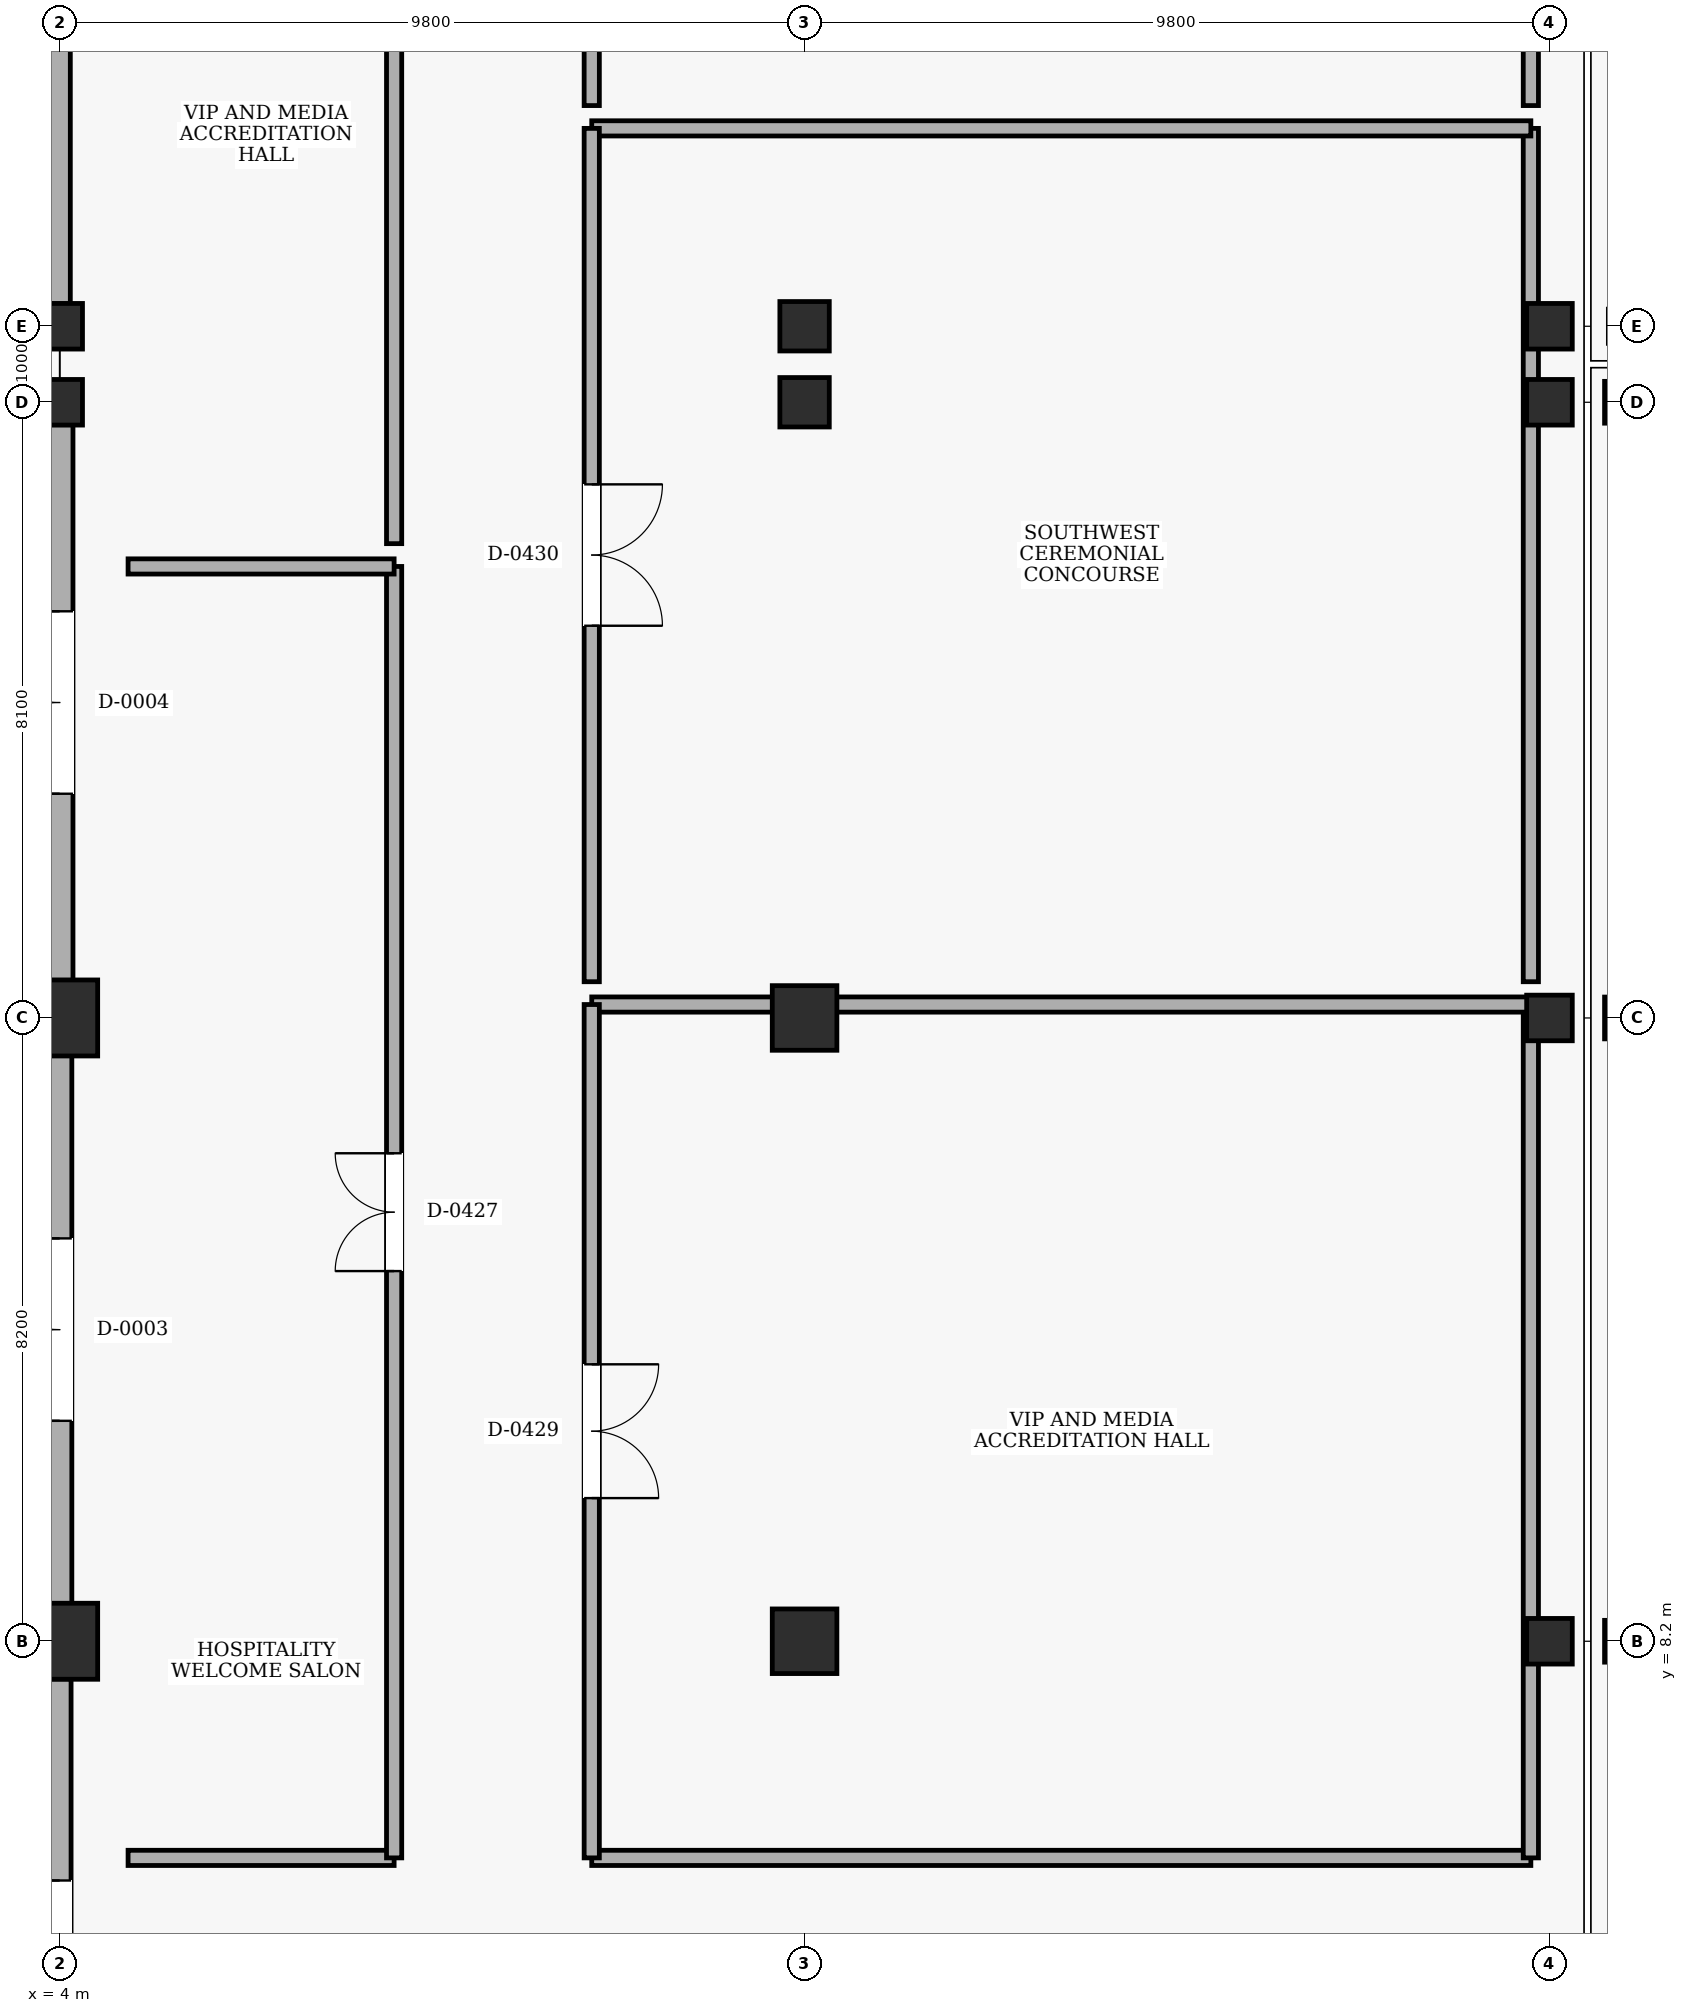
"""IFC4 building model, lengths in metres.
Left out: names, types, materials, properties, quantities, classifications, styles, units other than length and angle.
Written with IfcOpenShell. Run it as: python <this file> out.ifc"""

import sys

from ifc_helpers import new_model, si_unit, direction, frame, frame_2d, origin, origin_2d, place, context, subcontext, project, spatial, rectangle, extrude, element, fill, save


model = new_model("IFC4")
c1 = context("Model", 3, precision=1e-05, world=origin(), true_north=direction((0.0, 1.0)))
c2 = subcontext(c1, "Body", "Model", "MODEL_VIEW")
j1 = project(units=[si_unit("LENGTHUNIT", "METRE"), si_unit("PLANEANGLEUNIT", "RADIAN")], contexts=[c1])
p1 = place(None, origin())
s1 = spatial("IfcSite", under=j1, at=p1, CompositionType="ELEMENT")
p2 = place(p1, origin())
s2 = spatial("IfcBuilding", under=s1, at=p2, CompositionType="ELEMENT")
p3 = place(p2, origin())
s3 = spatial("IfcBuildingStorey", under=s2, at=p3, CompositionType="ELEMENT", Elevation=0.0)
for number, where, z_axis, x_axis in (
    (1, (4.0, 8.2, 0.0), (0.0, 0.0, 1.0), (1.0, 0.0, 0.0)),
    (2, (4.0, 16.4, 0.0), (0.0, 0.0, 1.0), (1.0, 0.0, 0.0)),
):
    element("IfcColumn", number, at=place(p3, frame(where, z_axis=z_axis, x_axis=x_axis)), inside=s3, PredefinedType="COLUMN", context=c2, shape_type="SweptSolid", body=[
        extrude(rectangle(XDim=1.0, YDim=1.0, at=origin_2d()), origin(), (0.0, 0.0, 1.0), 5.4),
    ])
for number, where, z_axis, x_axis in (
    (3, (4.0, 24.5, 0.0), (0.0, 0.0, 1.0), (1.0, 0.0, 0.0)),
    (4, (4.0, 25.5, 0.0), (0.0, 0.0, 1.0), (1.0, 0.0, 0.0)),
):
    element("IfcColumn", number, at=place(p3, frame(where, z_axis=z_axis, x_axis=x_axis)), inside=s3, PredefinedType="COLUMN", context=c2, shape_type="SweptSolid", body=[
        extrude(rectangle(XDim=0.6, YDim=0.6, at=origin_2d()), origin(), (0.0, 0.0, 1.0), 5.4),
    ])
for number, where, z_axis, x_axis in (
    (5, (13.8, 8.2, 0.0), (0.0, 0.0, 1.0), (1.0, 0.0, 0.0)),
    (6, (13.8, 16.4, 0.0), (0.0, 0.0, 1.0), (1.0, 0.0, 0.0)),
):
    element("IfcColumn", number, at=place(p3, frame(where, z_axis=z_axis, x_axis=x_axis)), inside=s3, PredefinedType="COLUMN", context=c2, shape_type="SweptSolid", body=[
        extrude(rectangle(XDim=0.85, YDim=0.85, at=origin_2d()), origin(), (0.0, 0.0, 1.0), 5.4),
    ])
for number, where, z_axis, x_axis in (
    (7, (13.8, 24.5, 0.0), (0.0, 0.0, 1.0), (1.0, 0.0, 0.0)),
    (8, (13.8, 25.5, 0.0), (0.0, 0.0, 1.0), (1.0, 0.0, 0.0)),
):
    element("IfcColumn", number, at=place(p3, frame(where, z_axis=z_axis, x_axis=x_axis)), inside=s3, PredefinedType="COLUMN", context=c2, shape_type="SweptSolid", body=[
        extrude(rectangle(XDim=0.65, YDim=0.65, at=origin_2d()), origin(), (0.0, 0.0, 1.0), 5.4),
    ])
for number, where, z_axis, x_axis in (
    (9, (23.6, 8.2, 0.0), (0.0, 0.0, 1.0), (1.0, 0.0, 0.0)),
    (10, (23.6, 16.4, 0.0), (0.0, 0.0, 1.0), (1.0, 0.0, 0.0)),
    (11, (23.6, 24.5, 0.0), (0.0, 0.0, 1.0), (1.0, 0.0, 0.0)),
    (12, (23.6, 25.5, 0.0), (0.0, 0.0, 1.0), (1.0, 0.0, 0.0)),
):
    element("IfcColumn", number, at=place(p3, frame(where, z_axis=z_axis, x_axis=x_axis)), inside=s3, PredefinedType="COLUMN", context=c2, shape_type="SweptSolid", body=[
        extrude(rectangle(XDim=0.6, YDim=0.6, at=origin_2d()), origin(), (0.0, 0.0, 1.0), 5.4),
    ])
for number, where, z_axis, x_axis in (
    (13, (24.6, 8.2, 0.0), (0.0, 0.0, 1.0), (1.0, 0.0, 0.0)),
    (14, (24.6, 16.4, 0.0), (0.0, 0.0, 1.0), (1.0, 0.0, 0.0)),
    (15, (24.6, 24.5, 0.0), (0.0, 0.0, 1.0), (1.0, 0.0, 0.0)),
):
    element("IfcColumn", number, at=place(p3, frame(where, z_axis=z_axis, x_axis=x_axis)), inside=s3, PredefinedType="COLUMN", context=c2, shape_type="SweptSolid", body=[
        extrude(rectangle(XDim=0.55, YDim=0.55, at=origin_2d()), origin(), (0.0, 0.0, 1.0), 5.4),
    ])
p4 = place(p3, frame((4.0, 0.0, 0.0), z_axis=(0.0, 0.0, 1.0), x_axis=(0.0, 1.0, 0.0)))
e16 = element("IfcWall", 16, at=p4, inside=s3, PredefinedType="SOLIDWALL", context=c2, shape_type="SweptSolid", body=[
    extrude(rectangle(XDim=7.705, YDim=0.3, at=frame_2d((3.853, 0.0))), origin(), (0.0, 0.0, 1.0), 5.08),
])
p5 = place(p4, frame((2.653, 0.0, 0.0)))
e17 = element("IfcOpeningElement", 17, at=p5, cuts=e16, PredefinedType="OPENING", context=c2, shape_type="SweptSolid", body=[
    extrude(rectangle(XDim=2.4, YDim=2.2, at=frame_2d((1.2, 1.1))), frame((0.0, 0.16, 0.0), z_axis=(0.0, -1.0, 0.0), x_axis=(1.0, 0.0, 0.0)), (0.0, 0.0, 1.0), 0.32),
])
p6 = place(p3, frame((4.0, 8.695, 0.0), z_axis=(0.0, 0.0, 1.0), x_axis=(0.0, 1.0, 0.0)))
e18 = element("IfcWall", 18, at=p6, inside=s3, PredefinedType="SOLIDWALL", context=c2, shape_type="SweptSolid", body=[
    extrude(rectangle(XDim=7.21, YDim=0.32, at=frame_2d((3.605, 0.0))), origin(), (0.0, 0.0, 1.0), 4.26),
])
p7 = place(p6, frame((2.405, 0.0, 0.0)))
e19 = element("IfcOpeningElement", 19, at=p7, cuts=e18, PredefinedType="OPENING", context=c2, shape_type="SweptSolid", body=[
    extrude(rectangle(XDim=2.4, YDim=2.2, at=frame_2d((1.2, 1.1))), frame((0.0, 0.17, 0.0), z_axis=(0.0, -1.0, 0.0), x_axis=(1.0, 0.0, 0.0)), (0.0, 0.0, 1.0), 0.34),
])
p8 = place(p3, frame((4.0, 16.895, 0.0), z_axis=(0.0, 0.0, 1.0), x_axis=(0.0, 1.0, 0.0)))
e20 = element("IfcWall", 20, at=p8, inside=s3, PredefinedType="SOLIDWALL", context=c2, shape_type="SweptSolid", body=[
    extrude(rectangle(XDim=7.31, YDim=0.35, at=frame_2d((3.655, 0.0))), origin(), (0.0, 0.0, 1.0), 4.26),
])
p9 = place(p8, frame((2.455, 0.0, 0.0)))
e21 = element("IfcOpeningElement", 21, at=p9, cuts=e20, PredefinedType="OPENING", context=c2, shape_type="SweptSolid", body=[
    extrude(rectangle(XDim=2.4, YDim=2.2, at=frame_2d((1.2, 1.1))), frame((0.0, 0.185, 0.0), z_axis=(0.0, -1.0, 0.0), x_axis=(1.0, 0.0, 0.0)), (0.0, 0.0, 1.0), 0.37),
])
p10 = place(p3, frame((4.0, 25.795, 0.0), z_axis=(0.0, 0.0, 1.0), x_axis=(0.0, 1.0, 0.0)))
e22 = element("IfcWall", 22, at=p10, inside=s3, PredefinedType="SOLIDWALL", context=c2, shape_type="SweptSolid", body=[
    extrude(rectangle(XDim=13.61, YDim=0.28, at=frame_2d((6.805, 0.0))), origin(), (0.0, 0.0, 1.0), 4.61),
])
p11 = place(p10, frame((5.605, 0.0, 0.0)))
e23 = element("IfcOpeningElement", 23, at=p11, cuts=e22, PredefinedType="OPENING", context=c2, shape_type="SweptSolid", body=[
    extrude(rectangle(XDim=2.4, YDim=2.2, at=frame_2d((1.2, 1.1))), frame((0.0, 0.15, 0.0), z_axis=(0.0, -1.0, 0.0), x_axis=(1.0, 0.0, 0.0)), (0.0, 0.0, 1.0), 0.3),
])
p12 = place(p3, frame((4.9, 5.35, 0.0), z_axis=(0.0, 0.0, 1.0), x_axis=(1.0, 0.0, 0.0)))
e24 = element("IfcWall", 24, at=p12, inside=s3, PredefinedType="PARTITIONING", context=c2, shape_type="SweptSolid", body=[
    extrude(rectangle(XDim=3.5, YDim=0.2, at=frame_2d((1.75, 0.0))), origin(), (0.0, 0.0, 1.0), 5.08),
])
p13 = place(p3, frame((8.4, 5.35, 0.0), z_axis=(0.0, 0.0, 1.0), x_axis=(0.0, 1.0, 0.0)))
e25 = element("IfcWall", 25, at=p13, inside=s3, PredefinedType="PARTITIONING", context=c2, shape_type="SweptSolid", body=[
    extrude(rectangle(XDim=16.99, YDim=0.2, at=frame_2d((8.495, 0.0))), origin(), (0.0, 0.0, 1.0), 5.08),
])
p14 = place(p13, frame((7.72, 0.0, 0.0)))
e26 = element("IfcOpeningElement", 26, at=p14, cuts=e25, PredefinedType="OPENING", context=c2, shape_type="SweptSolid", body=[
    extrude(rectangle(XDim=1.55, YDim=2.2, at=frame_2d((0.775, 1.1))), frame((0.0, 0.11, 0.0), z_axis=(0.0, -1.0, 0.0), x_axis=(1.0, 0.0, 0.0)), (0.0, 0.0, 1.0), 0.22),
])
p15 = place(p3, frame((8.4, 22.34, 0.0), z_axis=(0.0, 0.0, 1.0), x_axis=(-1.0, 0.0, 0.0)))
e27 = element("IfcWall", 27, at=p15, inside=s3, PredefinedType="PARTITIONING", context=c2, shape_type="SweptSolid", body=[
    extrude(rectangle(XDim=3.5, YDim=0.2, at=frame_2d((1.75, 0.0))), origin(), (0.0, 0.0, 1.0), 5.08),
])
p16 = place(p3, frame((8.4, 22.64, 0.0), z_axis=(0.0, 0.0, 1.0), x_axis=(0.0, 1.0, 0.0)))
e28 = element("IfcWall", 28, at=p16, inside=s3, PredefinedType="PARTITIONING", context=c2, shape_type="SweptSolid", body=[
    extrude(rectangle(XDim=16.99, YDim=0.2, at=frame_2d((8.495, 0.0))), origin(), (0.0, 0.0, 1.0), 5.08),
])
p17 = place(p16, frame((7.655, 0.0, 0.0)))
e29 = element("IfcOpeningElement", 29, at=p17, cuts=e28, PredefinedType="OPENING", context=c2, shape_type="SweptSolid", body=[
    extrude(rectangle(XDim=1.68, YDim=2.25, at=frame_2d((0.84, 1.125))), frame((0.0, 0.11, 0.0), z_axis=(0.0, -1.0, 0.0), x_axis=(1.0, 0.0, 0.0)), (0.0, 0.0, 1.0), 0.22),
])
p18 = place(p3, frame((11.0, 5.35, 0.0), z_axis=(0.0, 0.0, 1.0), x_axis=(1.0, 0.0, 0.0)))
e30 = element("IfcWall", 30, at=p18, inside=s3, PredefinedType="PARTITIONING", context=c2, shape_type="SweptSolid", body=[
    extrude(rectangle(XDim=12.355, YDim=0.2, at=frame_2d((6.177, 0.0))), origin(), (0.0, 0.0, 1.0), 5.08),
])
p19 = place(p3, frame((23.355, 5.35, 0.0), z_axis=(0.0, 0.0, 1.0), x_axis=(0.0, 1.0, 0.0)))
e31 = element("IfcWall", 31, at=p19, inside=s3, PredefinedType="PARTITIONING", context=c2, shape_type="SweptSolid", body=[
    extrude(rectangle(XDim=11.227, YDim=0.2, at=frame_2d((5.613, 0.0))), origin(), (0.0, 0.0, 1.0), 4.31),
])
p20 = place(p3, frame((23.355, 16.577, 0.0), z_axis=(0.0, 0.0, 1.0), x_axis=(-1.0, 0.0, 0.0)))
e32 = element("IfcWall", 32, at=p20, inside=s3, PredefinedType="PARTITIONING", context=c2, shape_type="SweptSolid", body=[
    extrude(rectangle(XDim=12.355, YDim=0.2, at=frame_2d((6.177, 0.0))), origin(), (0.0, 0.0, 1.0), 4.21),
])
p21 = place(p3, frame((11.0, 16.577, 0.0), z_axis=(0.0, 0.0, 1.0), x_axis=(0.0, -1.0, 0.0)))
e33 = element("IfcWall", 33, at=p21, inside=s3, PredefinedType="PARTITIONING", context=c2, shape_type="SweptSolid", body=[
    extrude(rectangle(XDim=11.227, YDim=0.2, at=frame_2d((5.613, 0.0))), origin(), (0.0, 0.0, 1.0), 5.08),
])
p22 = place(p21, frame((4.733, 0.0, 0.0)))
e34 = element("IfcOpeningElement", 34, at=p22, cuts=e33, PredefinedType="OPENING", context=c2, shape_type="SweptSolid", body=[
    extrude(rectangle(XDim=1.76, YDim=2.25, at=frame_2d((0.88, 1.125))), frame((0.0, 0.11, 0.0), z_axis=(0.0, -1.0, 0.0), x_axis=(1.0, 0.0, 0.0)), (0.0, 0.0, 1.0), 0.22),
])
p23 = place(p3, frame((23.355, 16.877, 0.0), z_axis=(0.0, 0.0, 1.0), x_axis=(0.0, 1.0, 0.0)))
e35 = element("IfcWall", 35, at=p23, inside=s3, PredefinedType="PARTITIONING", context=c2, shape_type="SweptSolid", body=[
    extrude(rectangle(XDim=11.227, YDim=0.2, at=frame_2d((5.613, 0.0))), origin(), (0.0, 0.0, 1.0), 4.31),
])
p24 = place(p3, frame((23.355, 28.103, 0.0), z_axis=(0.0, 0.0, 1.0), x_axis=(-1.0, 0.0, 0.0)))
e36 = element("IfcWall", 36, at=p24, inside=s3, PredefinedType="PARTITIONING", context=c2, shape_type="SweptSolid", body=[
    extrude(rectangle(XDim=12.355, YDim=0.2, at=frame_2d((6.177, 0.0))), origin(), (0.0, 0.0, 1.0), 5.08),
])
p25 = place(p3, frame((11.0, 28.103, 0.0), z_axis=(0.0, 0.0, 1.0), x_axis=(0.0, -1.0, 0.0)))
e37 = element("IfcWall", 37, at=p25, inside=s3, PredefinedType="PARTITIONING", context=c2, shape_type="SweptSolid", body=[
    extrude(rectangle(XDim=11.227, YDim=0.2, at=frame_2d((5.613, 0.0))), origin(), (0.0, 0.0, 1.0), 5.08),
])
p26 = place(p25, frame((4.683, 0.0, 0.0)))
e38 = element("IfcOpeningElement", 38, at=p26, cuts=e37, PredefinedType="OPENING", context=c2, shape_type="SweptSolid", body=[
    extrude(rectangle(XDim=1.86, YDim=2.3, at=frame_2d((0.93, 1.15))), frame((0.0, 0.11, 0.0), z_axis=(0.0, -1.0, 0.0), x_axis=(1.0, 0.0, 0.0)), (0.0, 0.0, 1.0), 0.22),
])
p27 = place(p3, frame((23.355, 28.403, 0.0), z_axis=(0.0, 0.0, 1.0), x_axis=(0.0, 1.0, 0.0)))
e39 = element("IfcWall", 39, at=p27, inside=s3, PredefinedType="PARTITIONING", context=c2, shape_type="SweptSolid", body=[
    extrude(rectangle(XDim=11.227, YDim=0.2, at=frame_2d((5.613, 0.0))), origin(), (0.0, 0.0, 1.0), 4.61),
])
p28 = place(p3, frame((11.0, 39.63, 0.0), z_axis=(0.0, 0.0, 1.0), x_axis=(0.0, -1.0, 0.0)))
e40 = element("IfcWall", 40, at=p28, inside=s3, PredefinedType="PARTITIONING", context=c2, shape_type="SweptSolid", body=[
    extrude(rectangle(XDim=11.227, YDim=0.2, at=frame_2d((5.613, 0.0))), origin(), (0.0, 0.0, 1.0), 5.08),
])
p29 = place(p28, frame((4.633, 0.0, 0.0)))
e41 = element("IfcOpeningElement", 41, at=p29, cuts=e40, PredefinedType="OPENING", context=c2, shape_type="SweptSolid", body=[
    extrude(rectangle(XDim=1.96, YDim=2.3, at=frame_2d((0.98, 1.15))), frame((0.0, 0.11, 0.0), z_axis=(0.0, -1.0, 0.0), x_axis=(1.0, 0.0, 0.0)), (0.0, 0.0, 1.0), 0.22),
])
p30 = place(p5, origin())
e42 = element("IfcDoor", 42, at=p30, inside=s3, OperationType="DOUBLE_DOOR_SINGLE_SWING", PredefinedType="DOOR", context=c2, shape_type="SweptSolid", body=[
    extrude(rectangle(XDim=2.4, YDim=2.2, at=frame_2d((1.2, 1.1))), frame((0.0, 0.025, 0.0), z_axis=(0.0, -1.0, 0.0), x_axis=(1.0, 0.0, 0.0)), (0.0, 0.0, 1.0), 0.05),
])
fill(e17, e42)
p31 = place(p7, origin())
e43 = element("IfcDoor", 43, at=p31, inside=s3, OperationType="DOUBLE_DOOR_SINGLE_SWING", PredefinedType="DOOR", context=c2, shape_type="SweptSolid", body=[
    extrude(rectangle(XDim=2.4, YDim=2.2, at=frame_2d((1.2, 1.1))), frame((0.0, 0.025, 0.0), z_axis=(0.0, -1.0, 0.0), x_axis=(1.0, 0.0, 0.0)), (0.0, 0.0, 1.0), 0.05),
])
fill(e19, e43)
p32 = place(p9, origin())
e44 = element("IfcDoor", 44, at=p32, inside=s3, OperationType="DOUBLE_DOOR_SINGLE_SWING", PredefinedType="DOOR", context=c2, shape_type="SweptSolid", body=[
    extrude(rectangle(XDim=2.4, YDim=2.2, at=frame_2d((1.2, 1.1))), frame((0.0, 0.025, 0.0), z_axis=(0.0, -1.0, 0.0), x_axis=(1.0, 0.0, 0.0)), (0.0, 0.0, 1.0), 0.05),
])
fill(e21, e44)
p33 = place(p14, origin())
e45 = element("IfcDoor", 45, at=p33, inside=s3, OperationType="DOUBLE_DOOR_SINGLE_SWING", PredefinedType="DOOR", context=c2, shape_type="SweptSolid", body=[
    extrude(rectangle(XDim=1.55, YDim=2.2, at=frame_2d((0.775, 1.1))), frame((0.0, 0.025, 0.0), z_axis=(0.0, -1.0, 0.0), x_axis=(1.0, 0.0, 0.0)), (0.0, 0.0, 1.0), 0.05),
])
fill(e26, e45)
p34 = place(p22, origin())
e46 = element("IfcDoor", 46, at=p34, inside=s3, OperationType="DOUBLE_DOOR_SINGLE_SWING", PredefinedType="DOOR", context=c2, shape_type="SweptSolid", body=[
    extrude(rectangle(XDim=1.76, YDim=2.25, at=frame_2d((0.88, 1.125))), frame((0.0, 0.025, 0.0), z_axis=(0.0, -1.0, 0.0), x_axis=(1.0, 0.0, 0.0)), (0.0, 0.0, 1.0), 0.05),
])
fill(e34, e46)
p35 = place(p26, origin())
e47 = element("IfcDoor", 47, at=p35, inside=s3, OperationType="DOUBLE_DOOR_SINGLE_SWING", PredefinedType="DOOR", context=c2, shape_type="SweptSolid", body=[
    extrude(rectangle(XDim=1.86, YDim=2.3, at=frame_2d((0.93, 1.15))), frame((0.0, 0.025, 0.0), z_axis=(0.0, -1.0, 0.0), x_axis=(1.0, 0.0, 0.0)), (0.0, 0.0, 1.0), 0.05),
])
fill(e38, e47)
save(model, sys.argv[1])
